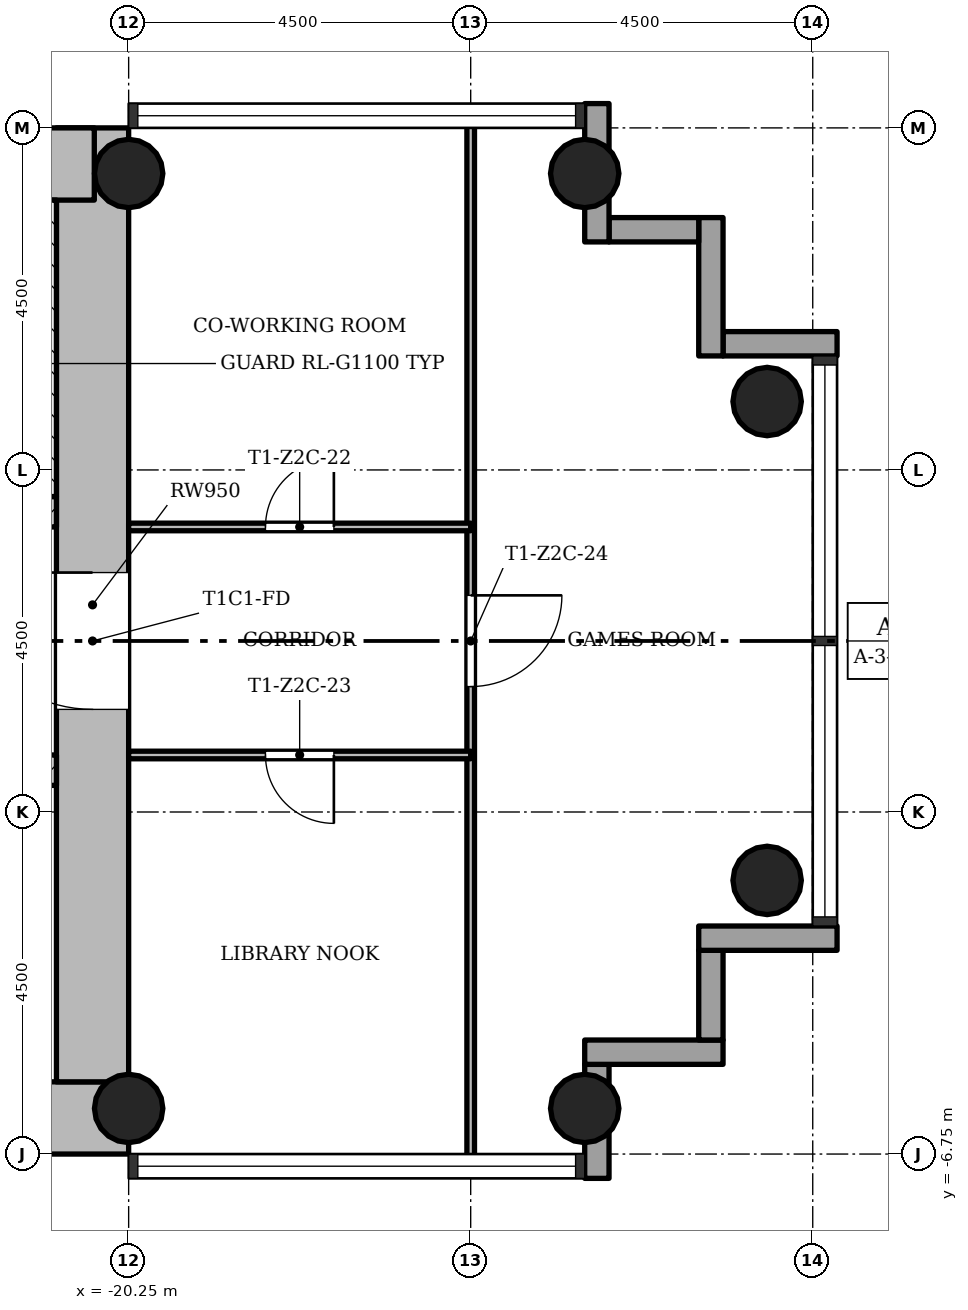
"""IFC4 building model, lengths in metres.
Left out: names, types, materials, properties, quantities, classifications, styles, units other than length and angle.
Written with IfcOpenShell. Run it as: python <this file> out.ifc"""

import sys

from ifc_helpers import new_model, si_unit, direction, frame, frame_2d, origin, origin_2d, place, context, subcontext, project, spatial, rectangle, hollow_circle, extrude, element, fill, save


model = new_model("IFC4")
c1 = context("Model", 3, precision=1e-05, world=origin(), true_north=direction((0.0, 1.0)))
c2 = subcontext(c1, "Body", "Model", "MODEL_VIEW")
j1 = project(units=[si_unit("LENGTHUNIT", "METRE"), si_unit("PLANEANGLEUNIT", "RADIAN")], contexts=[c1])
p1 = place(None, origin())
s1 = spatial("IfcSite", under=j1, at=p1, CompositionType="ELEMENT")
p2 = place(p1, origin())
s2 = spatial("IfcBuilding", under=s1, at=p2, CompositionType="ELEMENT")
p3 = place(p2, frame((0.0, 0.0, 90.2)))
s3 = spatial("IfcBuildingStorey", under=s2, at=p3, CompositionType="ELEMENT", Elevation=90.2)
p4 = place(p3, frame((-28.3, -6.275, 0.0), z_axis=(0.0, 0.0, 1.0), x_axis=(1.0, 0.0, 0.0)))
e1 = element("IfcWall", 1, at=p4, inside=s3, PredefinedType="SHEAR", context=c2, shape_type="SweptSolid", body=[
    extrude(rectangle(XDim=8.05, YDim=0.95, at=frame_2d((4.025, 0.0))), origin(), (0.0, 0.0, 1.0), 3.4),
])
p5 = place(p3, frame((-20.725, -5.8, 0.0), z_axis=(0.0, 0.0, 1.0), x_axis=(0.0, 1.0, 0.0)))
e2 = element("IfcWall", 2, at=p5, inside=s3, PredefinedType="SHEAR", context=c2, shape_type="SweptSolid", body=[
    extrude(rectangle(XDim=12.55, YDim=0.95, at=frame_2d((6.275, 0.0))), origin(), (0.0, 0.0, 1.0), 3.4),
])
p6 = place(p5, frame((4.9, 0.0, 0.0)))
e3 = element("IfcOpeningElement", 3, at=p6, cuts=e2, PredefinedType="OPENING", context=c2, shape_type="SweptSolid", body=[
    extrude(rectangle(XDim=1.8, YDim=2.1, at=frame_2d((0.9, 1.05))), frame((0.0, 0.485, 0.0), z_axis=(0.0, -1.0, 0.0), x_axis=(1.0, 0.0, 0.0)), (0.0, 0.0, 1.0), 0.97),
])
p7 = place(p3, frame((-20.702, 6.275, 0.0), z_axis=(0.0, 0.0, 1.0), x_axis=(-1.0, 0.0, 0.0)))
e4 = element("IfcWall", 4, at=p7, inside=s3, PredefinedType="SHEAR", context=c2, shape_type="SweptSolid", body=[
    extrude(rectangle(XDim=8.696, YDim=0.95, at=frame_2d((4.348, 0.0))), origin(), (0.0, 0.0, 1.0), 3.4),
])
p8 = place(p3, frame((-28.3, -1.7, 0.0), z_axis=(0.0, 0.0, 1.0), x_axis=(1.0, 0.0, 0.0)))
e5 = element("IfcWall", 5, at=p8, inside=s3, PredefinedType="SHEAR", context=c2, shape_type="SweptSolid", body=[
    extrude(rectangle(XDim=7.1, YDim=0.4, at=frame_2d((3.55, 0.0))), origin(), (0.0, 0.0, 1.0), 3.4),
])
p9 = place(p8, frame((0.8, 0.0, 0.0)))
e6 = element("IfcOpeningElement", 6, at=p9, cuts=e5, PredefinedType="OPENING", context=c2, shape_type="SweptSolid", body=[
    extrude(rectangle(XDim=1.1, YDim=2.1, at=frame_2d((0.55, 1.05))), frame((0.0, 0.21, 0.0), z_axis=(0.0, -1.0, 0.0), x_axis=(1.0, 0.0, 0.0)), (0.0, 0.0, 1.0), 0.42),
])
p10 = place(p8, frame((3.0, 0.0, 0.0)))
e7 = element("IfcOpeningElement", 7, at=p10, cuts=e5, PredefinedType="OPENING", context=c2, shape_type="SweptSolid", body=[
    extrude(rectangle(XDim=1.1, YDim=2.1, at=frame_2d((0.55, 1.05))), frame((0.0, 0.21, 0.0), z_axis=(0.0, -1.0, 0.0), x_axis=(1.0, 0.0, 0.0)), (0.0, 0.0, 1.0), 0.42),
])
p11 = place(p8, frame((5.2, 0.0, 0.0)))
e8 = element("IfcOpeningElement", 8, at=p11, cuts=e5, PredefinedType="OPENING", context=c2, shape_type="SweptSolid", body=[
    extrude(rectangle(XDim=1.1, YDim=2.1, at=frame_2d((0.55, 1.05))), frame((0.0, 0.21, 0.0), z_axis=(0.0, -1.0, 0.0), x_axis=(1.0, 0.0, 0.0)), (0.0, 0.0, 1.0), 0.42),
])
p12 = place(p3, frame((-28.3, 1.7, 0.0), z_axis=(0.0, 0.0, 1.0), x_axis=(1.0, 0.0, 0.0)))
e9 = element("IfcWall", 9, at=p12, inside=s3, PredefinedType="SHEAR", context=c2, shape_type="SweptSolid", body=[
    extrude(rectangle(XDim=7.1, YDim=0.4, at=frame_2d((3.55, 0.0))), origin(), (0.0, 0.0, 1.0), 3.4),
])
p13 = place(p12, frame((0.7, 0.0, 0.0)))
e10 = element("IfcOpeningElement", 10, at=p13, cuts=e9, PredefinedType="OPENING", context=c2, shape_type="SweptSolid", body=[
    extrude(rectangle(XDim=0.9, YDim=2.1, at=frame_2d((0.45, 1.05))), frame((0.0, 0.21, 0.0), z_axis=(0.0, -1.0, 0.0), x_axis=(1.0, 0.0, 0.0)), (0.0, 0.0, 1.0), 0.42),
])
for number, where, z_axis, x_axis in (
    (11, (-20.25, -6.15, 0.0), (0.0, 0.0, 1.0), (1.0, 0.0, 0.0)),
    (12, (-20.25, 6.15, 0.0), (0.0, 0.0, 1.0), (1.0, 0.0, 0.0)),
    (13, (-14.25, -6.15, 0.0), (0.0, 0.0, 1.0), (1.0, 0.0, 0.0)),
    (14, (-14.25, 6.15, 0.0), (0.0, 0.0, 1.0), (1.0, 0.0, 0.0)),
    (15, (-11.85, -3.15, 0.0), (0.0, 0.0, 1.0), (1.0, 0.0, 0.0)),
    (16, (-11.85, 3.15, 0.0), (0.0, 0.0, 1.0), (1.0, 0.0, 0.0)),
):
    element("IfcColumn", number, at=place(p3, frame(where, z_axis=z_axis, x_axis=x_axis)), inside=s3, PredefinedType="COLUMN", context=c2, shape_type="SweptSolid", body=[
        extrude(hollow_circle(Radius=0.45, WallThickness=0.032, at=origin_2d()), origin(), (0.0, 0.0, 1.0), 3.4),
    ])
p14 = place(p3, frame((-14.09, -7.07, -0.3), z_axis=(0.0, 0.0, 1.0), x_axis=(0.0, 1.0, 0.0)))
e17 = element("IfcWall", 17, at=p14, inside=s3, PredefinedType="STANDARD", context=c2, shape_type="SweptSolid", body=[
    extrude(rectangle(XDim=1.5, YDim=0.32, at=frame_2d((0.75, 0.0))), origin(), (0.0, 0.0, 1.0), 3.4),
])
p15 = place(p3, frame((-14.25, -5.41, -0.3), z_axis=(0.0, 0.0, 1.0), x_axis=(1.0, 0.0, 0.0)))
e18 = element("IfcWall", 18, at=p15, inside=s3, PredefinedType="STANDARD", context=c2, shape_type="SweptSolid", body=[
    extrude(rectangle(XDim=1.82, YDim=0.32, at=frame_2d((0.91, 0.0))), origin(), (0.0, 0.0, 1.0), 3.4),
])
p16 = place(p3, frame((-12.59, -5.25, -0.3), z_axis=(0.0, 0.0, 1.0), x_axis=(0.0, 1.0, 0.0)))
e19 = element("IfcWall", 19, at=p16, inside=s3, PredefinedType="STANDARD", context=c2, shape_type="SweptSolid", body=[
    extrude(rectangle(XDim=1.18, YDim=0.32, at=frame_2d((0.59, 0.0))), origin(), (0.0, 0.0, 1.0), 3.4),
])
p17 = place(p3, frame((-12.75, -3.91, -0.3), z_axis=(0.0, 0.0, 1.0), x_axis=(1.0, 0.0, 0.0)))
e20 = element("IfcWall", 20, at=p17, inside=s3, PredefinedType="STANDARD", context=c2, shape_type="SweptSolid", body=[
    extrude(rectangle(XDim=1.82, YDim=0.32, at=frame_2d((0.91, 0.0))), origin(), (0.0, 0.0, 1.0), 3.4),
])
p18 = place(p3, frame((-10.93, 3.91, -0.3), z_axis=(0.0, 0.0, 1.0), x_axis=(-1.0, 0.0, 0.0)))
e21 = element("IfcWall", 21, at=p18, inside=s3, PredefinedType="STANDARD", context=c2, shape_type="SweptSolid", body=[
    extrude(rectangle(XDim=1.5, YDim=0.32, at=frame_2d((0.75, 0.0))), origin(), (0.0, 0.0, 1.0), 3.4),
])
p19 = place(p3, frame((-12.59, 3.75, -0.3), z_axis=(0.0, 0.0, 1.0), x_axis=(0.0, 1.0, 0.0)))
e22 = element("IfcWall", 22, at=p19, inside=s3, PredefinedType="STANDARD", context=c2, shape_type="SweptSolid", body=[
    extrude(rectangle(XDim=1.82, YDim=0.32, at=frame_2d((0.91, 0.0))), origin(), (0.0, 0.0, 1.0), 3.4),
])
p20 = place(p3, frame((-12.75, 5.41, -0.3), z_axis=(0.0, 0.0, 1.0), x_axis=(-1.0, 0.0, 0.0)))
e23 = element("IfcWall", 23, at=p20, inside=s3, PredefinedType="STANDARD", context=c2, shape_type="SweptSolid", body=[
    extrude(rectangle(XDim=1.18, YDim=0.32, at=frame_2d((0.59, 0.0))), origin(), (0.0, 0.0, 1.0), 3.4),
])
p21 = place(p3, frame((-14.09, 5.25, -0.3), z_axis=(0.0, 0.0, 1.0), x_axis=(0.0, 1.0, 0.0)))
e24 = element("IfcWall", 24, at=p21, inside=s3, PredefinedType="STANDARD", context=c2, shape_type="SweptSolid", body=[
    extrude(rectangle(XDim=1.82, YDim=0.32, at=frame_2d((0.91, 0.0))), origin(), (0.0, 0.0, 1.0), 3.4),
])
p22 = place(p3, frame((-15.75, -6.85, 0.0), z_axis=(0.0, 0.0, 1.0), x_axis=(0.0, 1.0, 0.0)))
e25 = element("IfcWall", 25, at=p22, inside=s3, PredefinedType="PARTITIONING", context=c2, shape_type="SweptSolid", body=[
    extrude(rectangle(XDim=13.7, YDim=0.1, at=frame_2d((6.85, 0.0))), origin(), (0.0, 0.0, 1.0), 3.0),
])
p23 = place(p22, frame((6.25, 0.0, 0.0)))
e26 = element("IfcOpeningElement", 26, at=p23, cuts=e25, PredefinedType="OPENING", context=c2, shape_type="SweptSolid", body=[
    extrude(rectangle(XDim=1.2, YDim=2.1, at=frame_2d((0.6, 1.05))), frame((0.0, 0.06, 0.0), z_axis=(0.0, -1.0, 0.0), x_axis=(1.0, 0.0, 0.0)), (0.0, 0.0, 1.0), 0.12),
])
p24 = place(p3, frame((-20.25, -1.5, 0.0), z_axis=(0.0, 0.0, 1.0), x_axis=(1.0, 0.0, 0.0)))
e27 = element("IfcWall", 27, at=p24, inside=s3, PredefinedType="PARTITIONING", context=c2, shape_type="SweptSolid", body=[
    extrude(rectangle(XDim=4.5, YDim=0.1, at=frame_2d((2.25, 0.0))), origin(), (0.0, 0.0, 1.0), 3.0),
])
p25 = place(p24, frame((1.8, 0.0, 0.0)))
e28 = element("IfcOpeningElement", 28, at=p25, cuts=e27, PredefinedType="OPENING", context=c2, shape_type="SweptSolid", body=[
    extrude(rectangle(XDim=0.9, YDim=2.1, at=frame_2d((0.45, 1.05))), frame((0.0, 0.06, 0.0), z_axis=(0.0, -1.0, 0.0), x_axis=(1.0, 0.0, 0.0)), (0.0, 0.0, 1.0), 0.12),
])
p26 = place(p3, frame((-20.25, 1.5, 0.0), z_axis=(0.0, 0.0, 1.0), x_axis=(1.0, 0.0, 0.0)))
e29 = element("IfcWall", 29, at=p26, inside=s3, PredefinedType="PARTITIONING", context=c2, shape_type="SweptSolid", body=[
    extrude(rectangle(XDim=4.5, YDim=0.1, at=frame_2d((2.25, 0.0))), origin(), (0.0, 0.0, 1.0), 3.0),
])
p27 = place(p26, frame((1.8, 0.0, 0.0)))
e30 = element("IfcOpeningElement", 30, at=p27, cuts=e29, PredefinedType="OPENING", context=c2, shape_type="SweptSolid", body=[
    extrude(rectangle(XDim=0.9, YDim=2.1, at=frame_2d((0.45, 1.05))), frame((0.0, 0.06, 0.0), z_axis=(0.0, -1.0, 0.0), x_axis=(1.0, 0.0, 0.0)), (0.0, 0.0, 1.0), 0.12),
])
p28 = place(p3, frame((-21.325, 1.9, 0.0), z_axis=(0.0, 0.0, 1.0), x_axis=(0.0, 1.0, 0.0)))
e31 = element("IfcWall", 31, at=p28, inside=s3, PredefinedType="SHEAR", context=c2, shape_type="SweptSolid", body=[
    extrude(rectangle(XDim=3.9, YDim=0.25, at=frame_2d((1.95, 0.0))), origin(), (0.0, 0.0, 1.0), 3.4),
])
p29 = place(p27, origin())
e32 = element("IfcDoor", 32, at=p29, inside=s3, OperationType="SINGLE_SWING_LEFT", PredefinedType="DOOR", context=c2, shape_type="SweptSolid", body=[
    extrude(rectangle(XDim=0.9, YDim=2.1, at=frame_2d((0.45, 1.05))), frame((0.0, 0.025, 0.0), z_axis=(0.0, -1.0, 0.0), x_axis=(1.0, 0.0, 0.0)), (0.0, 0.0, 1.0), 0.05),
])
fill(e30, e32)
p30 = place(p25, origin())
e33 = element("IfcDoor", 33, at=p30, inside=s3, OperationType="SINGLE_SWING_RIGHT", PredefinedType="DOOR", context=c2, shape_type="SweptSolid", body=[
    extrude(rectangle(XDim=0.9, YDim=2.1, at=frame_2d((0.45, 1.05))), frame((0.0, 0.025, 0.0), z_axis=(0.0, -1.0, 0.0), x_axis=(1.0, 0.0, 0.0)), (0.0, 0.0, 1.0), 0.05),
])
fill(e28, e33)
p31 = place(p23, origin())
e34 = element("IfcDoor", 34, at=p31, inside=s3, OperationType="SINGLE_SWING_RIGHT", PredefinedType="DOOR", context=c2, shape_type="SweptSolid", body=[
    extrude(rectangle(XDim=1.2, YDim=2.1, at=frame_2d((0.6, 1.05))), frame((0.0, 0.025, 0.0), z_axis=(0.0, -1.0, 0.0), x_axis=(1.0, 0.0, 0.0)), (0.0, 0.0, 1.0), 0.05),
])
fill(e26, e34)
p32 = place(p6, origin())
e35 = element("IfcDoor", 35, at=p32, inside=s3, OperationType="SINGLE_SWING_LEFT", PredefinedType="DOOR", context=c2, shape_type="SweptSolid", body=[
    extrude(rectangle(XDim=1.8, YDim=2.1, at=frame_2d((0.9, 1.05))), frame((0.0, 0.025, 0.0), z_axis=(0.0, -1.0, 0.0), x_axis=(1.0, 0.0, 0.0)), (0.0, 0.0, 1.0), 0.05),
])
fill(e3, e35)
save(model, sys.argv[1])
